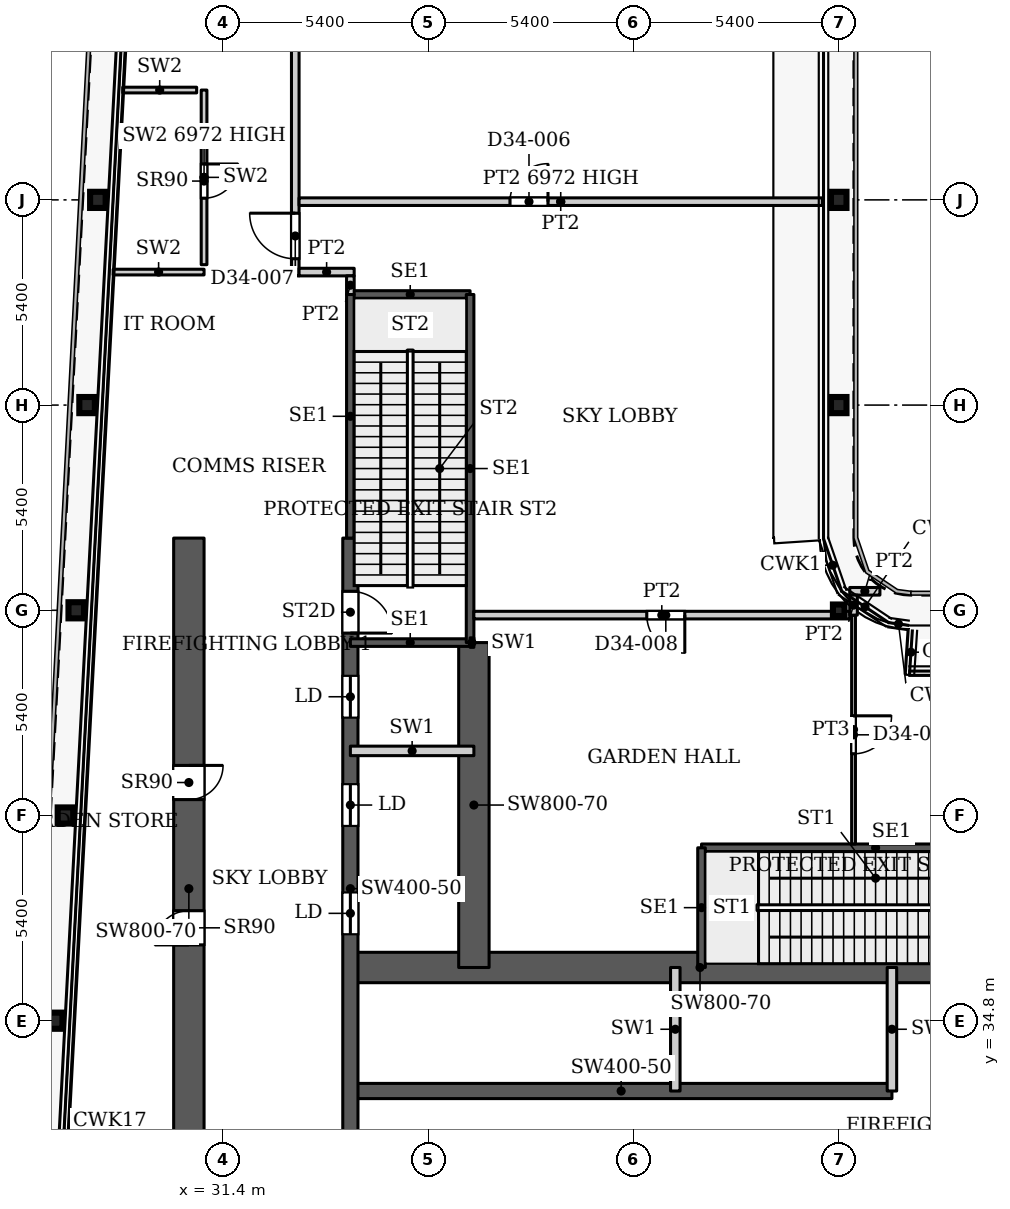
"""IFC4 building model, lengths in metres.
Left out: names, types, materials, properties, quantities, classifications, styles, units other than length and angle.
Written with IfcOpenShell. Run it as: python <this file> out.ifc"""

import sys

from ifc_helpers import new_model, si_unit, direction, frame, frame_2d, origin, origin_2d, place, context, subcontext, project, spatial, rectangle, hollow_rectangle, i_section, extrude, source, transform, mapped, element, fill, save


model = new_model("IFC4")
c1 = context("Model", 3, precision=1e-05, world=origin(), true_north=direction((0.0, 1.0)))
c2 = subcontext(c1, "Body", "Model", "MODEL_VIEW")
j1 = project(units=[si_unit("LENGTHUNIT", "METRE"), si_unit("PLANEANGLEUNIT", "RADIAN")], contexts=[c1])
p1 = place(None, origin())
s1 = spatial("IfcSite", under=j1, at=p1, CompositionType="ELEMENT")
p2 = place(p1, origin())
s2 = spatial("IfcBuilding", under=s1, at=p2, CompositionType="ELEMENT")
p3 = place(p2, frame((0.0, 0.0, 144.8)))
s3 = spatial("IfcBuildingStorey", under=s2, at=p3, CompositionType="ELEMENT", Elevation=144.8)
for number, where, z_axis, x_axis in (
    (1, (26.969, 34.8, 0.0), (0.0, 0.0, 1.0), (1.0, 0.0, 0.0)),
    (2, (27.253, 40.2, 0.0), (0.0, 0.0, 1.0), (1.0, 0.0, 0.0)),
    (3, (27.537, 45.6, 0.0), (0.0, 0.0, 1.0), (1.0, 0.0, 0.0)),
    (4, (27.822, 51.0, 0.0), (0.0, 0.0, 1.0), (1.0, 0.0, 0.0)),
    (5, (47.6, 51.0, 0.0), (0.0, 0.0, 1.0), (1.0, 0.0, 0.0)),
    (6, (28.106, 56.4, 0.0), (0.0, 0.0, 1.0), (1.0, 0.0, 0.0)),
    (7, (47.6, 56.4, 0.0), (0.0, 0.0, 1.0), (1.0, 0.0, 0.0)),
):
    element("IfcColumn", number, at=place(p3, frame(where, z_axis=z_axis, x_axis=x_axis)), inside=s3, PredefinedType="COLUMN", context=c2, shape_type="SweptSolid", body=[
        extrude(i_section(OverallWidth=0.409, OverallDepth=0.425, WebThickness=0.033, FlangeThickness=0.052, FilletRadius=0.013, at=origin_2d()), origin(), (0.0, 0.0, 1.0), 7.8),
    ])
p4 = place(p3, frame((47.6, 45.6, 0.0), z_axis=(0.0, 0.0, 1.0), x_axis=(1.0, 0.0, 0.0)))
e8 = element("IfcColumn", 8, at=p4, inside=s3, PredefinedType="COLUMN", context=c2, shape_type="SweptSolid", body=[
    extrude(hollow_rectangle(XDim=0.305, YDim=0.305, WallThickness=0.016, InnerFilletRadius=0.016, OuterFilletRadius=0.032, at=origin_2d()), origin(), (0.0, 0.0, 1.0), 7.8),
])
p5 = place(p3, frame((34.75, 32.95, 0.0), z_axis=(0.0, 0.0, 1.0), x_axis=(1.0, 0.0, 0.0)))
e9 = element("IfcWall", 9, at=p5, inside=s3, PredefinedType="SHEAR", context=c2, shape_type="SweptSolid", body=[
    extrude(rectangle(XDim=14.25, YDim=0.4, at=frame_2d((7.125, 0.0))), origin(), (0.0, 0.0, 1.0), 7.8),
])
p6 = place(p3, frame((34.75, 36.2, 0.0), z_axis=(0.0, 0.0, 1.0), x_axis=(1.0, 0.0, 0.0)))
e10 = element("IfcWall", 10, at=p6, inside=s3, PredefinedType="SHEAR", context=c2, shape_type="SweptSolid", body=[
    extrude(rectangle(XDim=18.4, YDim=0.8, at=frame_2d((9.2, 0.0))), origin(), (0.0, 0.0, 1.0), 7.8),
])
p7 = place(p6, frame((16.9, 0.0, 0.0)))
e11 = element("IfcOpeningElement", 11, at=p7, cuts=e10, PredefinedType="OPENING", context=c2, shape_type="SweptSolid", body=[
    extrude(rectangle(XDim=1.0, YDim=2.2, at=frame_2d((0.5, 1.1))), frame((0.0, 0.41, 0.0), z_axis=(0.0, -1.0, 0.0), x_axis=(1.0, 0.0, 0.0)), (0.0, 0.0, 1.0), 0.82),
])
p8 = place(p3, frame((34.75, 29.05, 0.0), z_axis=(0.0, 0.0, 1.0), x_axis=(0.0, 1.0, 0.0)))
e12 = element("IfcWall", 12, at=p8, inside=s3, PredefinedType="SHEAR", context=c2, shape_type="SweptSolid", body=[
    extrude(rectangle(XDim=18.45, YDim=0.4, at=frame_2d((9.225, 0.0))), origin(), (0.0, 0.0, 1.0), 7.8),
])
p9 = place(p8, frame((8.025, 0.0, 0.0)))
e13 = element("IfcOpeningElement", 13, at=p9, cuts=e12, PredefinedType="OPENING", context=c2, shape_type="SweptSolid", body=[
    extrude(rectangle(XDim=1.1, YDim=2.2, at=frame_2d((0.55, 1.1))), frame((0.0, 0.21, 0.0), z_axis=(0.0, -1.0, 0.0), x_axis=(1.0, 0.0, 0.0)), (0.0, 0.0, 1.0), 0.42),
])
p10 = place(p8, frame((10.875, 0.0, 0.0)))
e14 = element("IfcOpeningElement", 14, at=p10, cuts=e12, PredefinedType="OPENING", context=c2, shape_type="SweptSolid", body=[
    extrude(rectangle(XDim=1.1, YDim=2.2, at=frame_2d((0.55, 1.1))), frame((0.0, 0.21, 0.0), z_axis=(0.0, -1.0, 0.0), x_axis=(1.0, 0.0, 0.0)), (0.0, 0.0, 1.0), 0.42),
])
p11 = place(p8, frame((13.725, 0.0, 0.0)))
e15 = element("IfcOpeningElement", 15, at=p11, cuts=e12, PredefinedType="OPENING", context=c2, shape_type="SweptSolid", body=[
    extrude(rectangle(XDim=1.1, YDim=2.2, at=frame_2d((0.55, 1.1))), frame((0.0, 0.21, 0.0), z_axis=(0.0, -1.0, 0.0), x_axis=(1.0, 0.0, 0.0)), (0.0, 0.0, 1.0), 0.42),
])
p12 = place(p8, frame((15.95, 0.0, 0.0)))
e16 = element("IfcOpeningElement", 16, at=p12, cuts=e12, PredefinedType="OPENING", context=c2, shape_type="SweptSolid", body=[
    extrude(rectangle(XDim=1.1, YDim=2.2, at=frame_2d((0.55, 1.1))), frame((0.0, 0.21, 0.0), z_axis=(0.0, -1.0, 0.0), x_axis=(1.0, 0.0, 0.0)), (0.0, 0.0, 1.0), 0.42),
])
p13 = place(p3, frame((38.0, 36.2, 0.0), z_axis=(0.0, 0.0, 1.0), x_axis=(0.0, 1.0, 0.0)))
e17 = element("IfcWall", 17, at=p13, inside=s3, PredefinedType="SHEAR", context=c2, shape_type="SweptSolid", body=[
    extrude(rectangle(XDim=8.55, YDim=0.8, at=frame_2d((4.275, 0.0))), origin(), (0.0, 0.0, 1.0), 7.8),
])
p14 = place(p3, frame((30.5, 29.05, 0.0), z_axis=(0.0, 0.0, 1.0), x_axis=(0.0, 1.0, 0.0)))
e18 = element("IfcWall", 18, at=p14, inside=s3, PredefinedType="SHEAR", context=c2, shape_type="SweptSolid", body=[
    extrude(rectangle(XDim=18.45, YDim=0.8, at=frame_2d((9.225, 0.0))), origin(), (0.0, 0.0, 1.0), 7.8),
])
p15 = place(p14, frame((1.5, 0.0, 0.0)))
e19 = element("IfcOpeningElement", 19, at=p15, cuts=e18, PredefinedType="OPENING", context=c2, shape_type="SweptSolid", body=[
    extrude(rectangle(XDim=0.9, YDim=2.2, at=frame_2d((0.45, 1.1))), frame((0.0, 0.41, 0.0), z_axis=(0.0, -1.0, 0.0), x_axis=(1.0, 0.0, 0.0)), (0.0, 0.0, 1.0), 0.82),
])
p16 = place(p14, frame((7.744, 0.0, 0.0)))
e20 = element("IfcOpeningElement", 20, at=p16, cuts=e18, PredefinedType="OPENING", context=c2, shape_type="SweptSolid", body=[
    extrude(rectangle(XDim=0.9, YDim=2.2, at=frame_2d((0.45, 1.1))), frame((0.0, 0.41, 0.0), z_axis=(0.0, -1.0, 0.0), x_axis=(1.0, 0.0, 0.0)), (0.0, 0.0, 1.0), 0.82),
])
p17 = place(p14, frame((11.568, 0.0, 0.0)))
e21 = element("IfcOpeningElement", 21, at=p17, cuts=e18, PredefinedType="OPENING", context=c2, shape_type="SweptSolid", body=[
    extrude(rectangle(XDim=0.9, YDim=2.2, at=frame_2d((0.45, 1.1))), frame((0.0, 0.41, 0.0), z_axis=(0.0, -1.0, 0.0), x_axis=(1.0, 0.0, 0.0)), (0.0, 0.0, 1.0), 0.82),
])
p18 = place(p3, frame((43.99, 39.35, 0.0), z_axis=(0.0, 0.0, 1.0), x_axis=(1.0, 0.0, 0.0)))
e22 = element("IfcWall", 22, at=p18, inside=s3, PredefinedType="SHEAR", context=c2, shape_type="SweptSolid", body=[
    extrude(rectangle(XDim=9.16, YDim=0.2, at=frame_2d((4.58, 0.0))), origin(), (0.0, 0.0, 1.0), 7.8),
])
p19 = place(p3, frame((43.99, 36.2, 0.0), z_axis=(0.0, 0.0, 1.0), x_axis=(0.0, 1.0, 0.0)))
e23 = element("IfcWall", 23, at=p19, inside=s3, PredefinedType="SHEAR", context=c2, shape_type="SweptSolid", body=[
    extrude(rectangle(XDim=3.15, YDim=0.2, at=frame_2d((1.575, 0.0))), origin(), (0.0, 0.0, 1.0), 7.8),
])
for number, where, z_axis, x_axis in (
    (24, (34.75, 44.75, 0.0), (0.0, 0.0, 1.0), (1.0, 0.0, 0.0)),
    (25, (34.75, 53.91, 0.0), (0.0, 0.0, 1.0), (1.0, 0.0, 0.0)),
):
    element("IfcWall", number, at=place(p3, frame(where, z_axis=z_axis, x_axis=x_axis)), inside=s3, PredefinedType="SHEAR", context=c2, shape_type="SweptSolid", body=[
        extrude(rectangle(XDim=3.15, YDim=0.2, at=frame_2d((1.575, 0.0))), origin(), (0.0, 0.0, 1.0), 7.8),
    ])
p20 = place(p3, frame((34.75, 47.5, 0.0), z_axis=(0.0, 0.0, 1.0), x_axis=(0.0, 1.0, 0.0)))
e26 = element("IfcWall", 26, at=p20, inside=s3, PredefinedType="SHEAR", context=c2, shape_type="SweptSolid", body=[
    extrude(rectangle(XDim=6.41, YDim=0.2, at=frame_2d((3.205, 0.0))), origin(), (0.0, 0.0, 1.0), 7.8),
])
p21 = place(p3, frame((37.9, 44.75, 0.0), z_axis=(0.0, 0.0, 1.0), x_axis=(0.0, 1.0, 0.0)))
e27 = element("IfcWall", 27, at=p21, inside=s3, PredefinedType="SHEAR", context=c2, shape_type="SweptSolid", body=[
    extrude(rectangle(XDim=9.16, YDim=0.2, at=frame_2d((4.58, 0.0))), origin(), (0.0, 0.0, 1.0), 7.8),
])
for number, where, z_axis, x_axis in (
    (28, (43.3, 32.95, 0.0), (0.0, 0.0, 1.0), (0.0, 1.0, 0.0)),
    (29, (49.0, 32.95, 0.0), (0.0, 0.0, 1.0), (0.0, 1.0, 0.0)),
    (30, (34.75, 41.9, 0.0), (0.0, 0.0, 1.0), (1.0, 0.0, 0.0)),
):
    element("IfcWall", number, at=place(p3, frame(where, z_axis=z_axis, x_axis=x_axis)), inside=s3, PredefinedType="PARTITIONING", context=c2, shape_type="SweptSolid", body=[
        extrude(rectangle(XDim=3.25, YDim=0.25, at=frame_2d((1.625, 0.0))), origin(), (0.0, 0.0, 1.0), 7.8),
    ])
p22 = place(p3, frame((37.9, 44.75, 0.0), z_axis=(0.0, 0.0, 1.0), x_axis=(1.0, 0.0, 0.0)))
e31 = element("IfcWall", 31, at=p22, inside=s3, PredefinedType="PARTITIONING", context=c2, shape_type="SweptSolid", body=[
    extrude(rectangle(XDim=0.1, YDim=0.25, at=frame_2d((0.05, 0.0))), origin(), (0.0, 0.0, 1.0), 7.8),
])
p23 = place(p3, frame((28.508, 54.5, 0.0), z_axis=(0.0, 0.0, 1.0), x_axis=(1.0, 0.0, 0.0)))
e32 = element("IfcWall", 32, at=p23, inside=s3, PredefinedType="PARTITIONING", context=c2, shape_type="SweptSolid", body=[
    extrude(rectangle(XDim=2.392, YDim=0.15, at=frame_2d((1.196, 0.0))), origin(), (0.0, 0.0, 1.0), 7.8),
])
p24 = place(p3, frame((30.9, 54.695, 0.0), z_axis=(0.0, 0.0, 1.0), x_axis=(0.0, 1.0, 0.0)))
e33 = element("IfcWall", 33, at=p24, inside=s3, PredefinedType="PARTITIONING", context=c2, shape_type="SweptSolid", body=[
    extrude(rectangle(XDim=4.595, YDim=0.15, at=frame_2d((2.297, 0.0))), origin(), (0.0, 0.0, 1.0), 6.972),
])
p25 = place(p24, frame((1.75, 0.0, 0.0)))
e34 = element("IfcOpeningElement", 34, at=p25, cuts=e33, PredefinedType="OPENING", context=c2, shape_type="SweptSolid", body=[
    extrude(rectangle(XDim=0.9, YDim=2.2, at=frame_2d((0.45, 1.1))), frame((0.0, 0.085, 0.0), z_axis=(0.0, -1.0, 0.0), x_axis=(1.0, 0.0, 0.0)), (0.0, 0.0, 1.0), 0.17),
])
p26 = place(p3, frame((28.76, 59.29, 0.0), z_axis=(0.0, 0.0, 1.0), x_axis=(1.0, 0.0, 0.0)))
e35 = element("IfcWall", 35, at=p26, inside=s3, PredefinedType="PARTITIONING", context=c2, shape_type="SweptSolid", body=[
    extrude(rectangle(XDim=1.945, YDim=0.15, at=frame_2d((0.973, 0.0))), origin(), (0.0, 0.0, 1.0), 7.8),
])
p27 = place(p3, frame((33.3, 54.4, 0.0), z_axis=(0.0, 0.0, 1.0), x_axis=(0.0, 1.0, 0.0)))
e36 = element("IfcWall", 36, at=p27, inside=s3, PredefinedType="PARTITIONING", context=c2, shape_type="SweptSolid", body=[
    extrude(rectangle(XDim=25.0, YDim=0.2, at=frame_2d((12.5, 0.0))), origin(), (0.0, 0.0, 1.0), 7.5),
])
p28 = place(p27, frame((0.45, 0.0, 0.0)))
e37 = element("IfcOpeningElement", 37, at=p28, cuts=e36, PredefinedType="OPENING", context=c2, shape_type="SweptSolid", body=[
    extrude(rectangle(XDim=1.2, YDim=2.1, at=frame_2d((0.6, 1.05))), frame((0.0, 0.11, 0.0), z_axis=(0.0, -1.0, 0.0), x_axis=(1.0, 0.0, 0.0)), (0.0, 0.0, 1.0), 0.22),
])
p29 = place(p27, frame((6.493, 0.0, 0.0)))
e38 = element("IfcOpeningElement", 38, at=p29, cuts=e36, PredefinedType="OPENING", context=c2, shape_type="SweptSolid", body=[
    extrude(rectangle(XDim=1.8, YDim=2.1, at=frame_2d((0.9, 1.05))), frame((0.0, 0.11, 0.0), z_axis=(0.0, -1.0, 0.0), x_axis=(1.0, 0.0, 0.0)), (0.0, 0.0, 1.0), 0.22),
])
p30 = place(p27, frame((17.372, 0.0, 0.0)))
e39 = element("IfcOpeningElement", 39, at=p30, cuts=e36, PredefinedType="OPENING", context=c2, shape_type="SweptSolid", body=[
    extrude(rectangle(XDim=1.8, YDim=2.1, at=frame_2d((0.9, 1.05))), frame((0.0, 0.11, 0.0), z_axis=(0.0, -1.0, 0.0), x_axis=(1.0, 0.0, 0.0)), (0.0, 0.0, 1.0), 0.22),
])
p31 = place(p27, frame((23.912, 0.0, 0.0)))
e40 = element("IfcOpeningElement", 40, at=p31, cuts=e36, PredefinedType="OPENING", context=c2, shape_type="SweptSolid", body=[
    extrude(rectangle(XDim=0.9, YDim=2.1, at=frame_2d((0.45, 1.05))), frame((0.0, 0.11, 0.0), z_axis=(0.0, -1.0, 0.0), x_axis=(1.0, 0.0, 0.0)), (0.0, 0.0, 1.0), 0.22),
])
p32 = place(p3, frame((33.4, 54.5, 0.0), z_axis=(0.0, 0.0, 1.0), x_axis=(1.0, 0.0, 0.0)))
e41 = element("IfcWall", 41, at=p32, inside=s3, PredefinedType="PARTITIONING", context=c2, shape_type="SweptSolid", body=[
    extrude(rectangle(XDim=1.45, YDim=0.2, at=frame_2d((0.725, 0.0))), origin(), (0.0, 0.0, 1.0), 7.5),
])
p33 = place(p3, frame((33.4, 56.353, 0.0), z_axis=(0.0, 0.0, 1.0), x_axis=(1.0, 0.0, 0.0)))
e42 = element("IfcWall", 42, at=p33, inside=s3, PredefinedType="PARTITIONING", context=c2, shape_type="SweptSolid", body=[
    extrude(rectangle(XDim=13.77, YDim=0.2, at=frame_2d((6.885, 0.0))), origin(), (0.0, 0.0, 1.0), 6.972),
])
p34 = place(p33, frame((5.55, 0.0, 0.0)))
e43 = element("IfcOpeningElement", 43, at=p34, cuts=e42, PredefinedType="OPENING", context=c2, shape_type="SweptSolid", body=[
    extrude(rectangle(XDim=1.0, YDim=2.1, at=frame_2d((0.5, 1.05))), frame((0.0, 0.11, 0.0), z_axis=(0.0, -1.0, 0.0), x_axis=(1.0, 0.0, 0.0)), (0.0, 0.0, 1.0), 0.22),
])
p35 = place(p3, frame((34.75, 53.91, 0.0), z_axis=(0.0, 0.0, 1.0), x_axis=(0.0, 1.0, 0.0)))
e44 = element("IfcWall", 44, at=p35, inside=s3, PredefinedType="PARTITIONING", context=c2, shape_type="SweptSolid", body=[
    extrude(rectangle(XDim=0.49, YDim=0.2, at=frame_2d((0.245, 0.0))), origin(), (0.0, 0.0, 1.0), 7.5),
])
p36 = place(p3, frame((37.999, 45.473, 0.0), z_axis=(0.0, 0.0, 1.0), x_axis=(1.0, 0.0, 0.0)))
e45 = element("IfcWall", 45, at=p36, inside=s3, PredefinedType="PARTITIONING", context=c2, shape_type="SweptSolid", body=[
    extrude(rectangle(XDim=9.891, YDim=0.2, at=frame_2d((4.945, 0.0))), origin(), (0.0, 0.0, 1.0), 7.5),
])
p37 = place(p36, frame((4.551, 0.0, 0.0)))
e46 = element("IfcOpeningElement", 46, at=p37, cuts=e45, PredefinedType="OPENING", context=c2, shape_type="SweptSolid", body=[
    extrude(rectangle(XDim=1.0, YDim=2.1, at=frame_2d((0.5, 1.05))), frame((0.0, 0.11, 0.0), z_axis=(0.0, -1.0, 0.0), x_axis=(1.0, 0.0, 0.0)), (0.0, 0.0, 1.0), 0.22),
])
p38 = place(p3, frame((47.89, 46.1, 0.0), z_axis=(0.0, 0.0, 1.0), x_axis=(1.0, 0.0, 0.0)))
e47 = element("IfcWall", 47, at=p38, inside=s3, PredefinedType="PARTITIONING", context=c2, shape_type="SweptSolid", body=[
    extrude(rectangle(XDim=0.794, YDim=0.2, at=frame_2d((0.397, 0.0))), origin(), (0.0, 0.0, 1.0), 7.5),
])
p39 = place(p3, frame((47.99, 39.449, 0.0), z_axis=(0.0, 0.0, 1.0), x_axis=(0.0, 1.0, 0.0)))
e48 = element("IfcWall", 48, at=p39, inside=s3, PredefinedType="PARTITIONING", context=c2, shape_type="SweptSolid", body=[
    extrude(rectangle(XDim=6.024, YDim=0.1, at=frame_2d((3.012, 0.0))), origin(), (0.0, 0.0, 1.0), 7.5),
])
p40 = place(p39, frame((2.374, 0.0, 0.0)))
e49 = element("IfcOpeningElement", 49, at=p40, cuts=e48, PredefinedType="OPENING", context=c2, shape_type="SweptSolid", body=[
    extrude(rectangle(XDim=1.0, YDim=2.1, at=frame_2d((0.5, 1.05))), frame((0.0, 0.06, 0.0), z_axis=(0.0, -1.0, 0.0), x_axis=(1.0, 0.0, 0.0)), (0.0, 0.0, 1.0), 0.12),
])
p41 = place(p3, frame((47.99, 45.473, 0.0), z_axis=(0.0, 0.0, 1.0), x_axis=(0.0, 1.0, 0.0)))
e50 = element("IfcWall", 50, at=p41, inside=s3, PredefinedType="PARTITIONING", context=c2, shape_type="SweptSolid", body=[
    extrude(rectangle(XDim=0.527, YDim=0.2, at=frame_2d((0.264, 0.0))), origin(), (0.0, 0.0, 1.0), 7.5),
])
m1 = source(origin(), c2, "Body", "SweptSolid", [
    extrude(rectangle(XDim=1.1, YDim=2.2, at=frame_2d((0.55, 1.1))), frame((0.0, 0.025, 0.0), z_axis=(0.0, -1.0, 0.0), x_axis=(1.0, 0.0, 0.0)), (0.0, 0.0, 1.0), 0.05),
])
p42 = place(p9, origin())
e51 = element("IfcDoor", 51, at=p42, inside=s3, OperationType="SLIDING_TO_LEFT", PredefinedType="DOOR", context=c2, shape_type="MappedRepresentation", body=[
    mapped(m1, transform((0.0, 0.0, 0.0), x_axis=(1.0, 0.0, 0.0), y_axis=(0.0, 1.0, 0.0), z_axis=(0.0, 0.0, 1.0), scale=1.0)),
])
fill(e13, e51)
p43 = place(p10, origin())
e52 = element("IfcDoor", 52, at=p43, inside=s3, OperationType="SLIDING_TO_LEFT", PredefinedType="DOOR", context=c2, shape_type="MappedRepresentation", body=[
    mapped(m1, transform((0.0, 0.0, 0.0), x_axis=(1.0, 0.0, 0.0), y_axis=(0.0, 1.0, 0.0), z_axis=(0.0, 0.0, 1.0), scale=1.0)),
])
fill(e14, e52)
p44 = place(p11, origin())
e53 = element("IfcDoor", 53, at=p44, inside=s3, OperationType="SLIDING_TO_LEFT", PredefinedType="DOOR", context=c2, shape_type="MappedRepresentation", body=[
    mapped(m1, transform((0.0, 0.0, 0.0), x_axis=(1.0, 0.0, 0.0), y_axis=(0.0, 1.0, 0.0), z_axis=(0.0, 0.0, 1.0), scale=1.0)),
])
fill(e15, e53)
m2 = source(origin(), c2, "Body", "SweptSolid", [
    extrude(rectangle(XDim=0.9, YDim=2.2, at=frame_2d((0.45, 1.1))), frame((0.0, 0.025, 0.0), z_axis=(0.0, -1.0, 0.0), x_axis=(1.0, 0.0, 0.0)), (0.0, 0.0, 1.0), 0.05),
])
p45 = place(p16, origin())
e54 = element("IfcDoor", 54, at=p45, inside=s3, OperationType="SINGLE_SWING_LEFT", PredefinedType="DOOR", context=c2, shape_type="MappedRepresentation", body=[
    mapped(m2, transform((0.0, 0.0, 0.0), x_axis=(1.0, 0.0, 0.0), y_axis=(0.0, 1.0, 0.0), z_axis=(0.0, 0.0, 1.0), scale=1.0)),
])
fill(e20, e54)
p46 = place(p17, origin())
e55 = element("IfcDoor", 55, at=p46, inside=s3, OperationType="SINGLE_SWING_RIGHT", PredefinedType="DOOR", context=c2, shape_type="MappedRepresentation", body=[
    mapped(m2, transform((0.0, 0.0, 0.0), x_axis=(1.0, 0.0, 0.0), y_axis=(0.0, 1.0, 0.0), z_axis=(0.0, 0.0, 1.0), scale=1.0)),
])
fill(e21, e55)
p47 = place(p25, origin())
e56 = element("IfcDoor", 56, at=p47, inside=s3, OperationType="SINGLE_SWING_RIGHT", PredefinedType="DOOR", context=c2, shape_type="MappedRepresentation", body=[
    mapped(m2, transform((0.0, 0.0, 0.0), x_axis=(1.0, 0.0, 0.0), y_axis=(0.0, 1.0, 0.0), z_axis=(0.0, 0.0, 1.0), scale=1.0)),
])
fill(e34, e56)
m3 = source(origin(), c2, "Body", "SweptSolid", [
    extrude(rectangle(XDim=1.1, YDim=2.2, at=frame_2d((0.55, 1.1))), frame((0.0, 0.025, 0.0), z_axis=(0.0, -1.0, 0.0), x_axis=(1.0, 0.0, 0.0)), (0.0, 0.0, 1.0), 0.05),
])
p48 = place(p12, origin())
e57 = element("IfcDoor", 57, at=p48, inside=s3, OperationType="SINGLE_SWING_RIGHT", PredefinedType="DOOR", context=c2, shape_type="MappedRepresentation", body=[
    mapped(m3, transform((0.0, 0.0, 0.0), x_axis=(1.0, 0.0, 0.0), y_axis=(0.0, 1.0, 0.0), z_axis=(0.0, 0.0, 1.0), scale=1.0)),
])
fill(e16, e57)
m4 = source(origin(), c2, "Body", "SweptSolid", [
    extrude(rectangle(XDim=1.0, YDim=2.1, at=frame_2d((0.5, 1.05))), frame((0.0, 0.025, 0.0), z_axis=(0.0, -1.0, 0.0), x_axis=(1.0, 0.0, 0.0)), (0.0, 0.0, 1.0), 0.05),
])
p49 = place(p34, origin())
e58 = element("IfcDoor", 58, at=p49, inside=s3, OperationType="SINGLE_SWING_LEFT", PredefinedType="DOOR", context=c2, shape_type="MappedRepresentation", body=[
    mapped(m4, transform((0.0, 0.0, 0.0), x_axis=(1.0, 0.0, 0.0), y_axis=(0.0, 1.0, 0.0), z_axis=(0.0, 0.0, 1.0), scale=1.0)),
])
fill(e43, e58)
m5 = source(origin(), c2, "Body", "SweptSolid", [
    extrude(rectangle(XDim=1.2, YDim=2.1, at=frame_2d((0.6, 1.05))), frame((0.0, 0.025, 0.0), z_axis=(0.0, -1.0, 0.0), x_axis=(1.0, 0.0, 0.0)), (0.0, 0.0, 1.0), 0.05),
])
p50 = place(p28, origin())
e59 = element("IfcDoor", 59, at=p50, inside=s3, OperationType="SINGLE_SWING_LEFT", PredefinedType="DOOR", context=c2, shape_type="MappedRepresentation", body=[
    mapped(m5, transform((0.0, 0.0, 0.0), x_axis=(1.0, 0.0, 0.0), y_axis=(0.0, 1.0, 0.0), z_axis=(0.0, 0.0, 1.0), scale=1.0)),
])
fill(e37, e59)
p51 = place(p37, origin())
e60 = element("IfcDoor", 60, at=p51, inside=s3, OperationType="SINGLE_SWING_RIGHT", PredefinedType="DOOR", context=c2, shape_type="MappedRepresentation", body=[
    mapped(m4, transform((0.0, 0.0, 0.0), x_axis=(1.0, 0.0, 0.0), y_axis=(0.0, 1.0, 0.0), z_axis=(0.0, 0.0, 1.0), scale=1.0)),
])
fill(e46, e60)
m6 = source(origin(), c2, "Body", "SweptSolid", [
    extrude(rectangle(XDim=1.0, YDim=2.1, at=frame_2d((0.5, 1.05))), frame((0.0, 0.025, 0.0), z_axis=(0.0, -1.0, 0.0), x_axis=(1.0, 0.0, 0.0)), (0.0, 0.0, 1.0), 0.05),
])
p52 = place(p40, origin())
e61 = element("IfcDoor", 61, at=p52, inside=s3, OperationType="SINGLE_SWING_RIGHT", PredefinedType="DOOR", context=c2, shape_type="MappedRepresentation", body=[
    mapped(m6, transform((0.0, 0.0, 0.0), x_axis=(1.0, 0.0, 0.0), y_axis=(0.0, 1.0, 0.0), z_axis=(0.0, 0.0, 1.0), scale=1.0)),
])
fill(e49, e61)
save(model, sys.argv[1])
